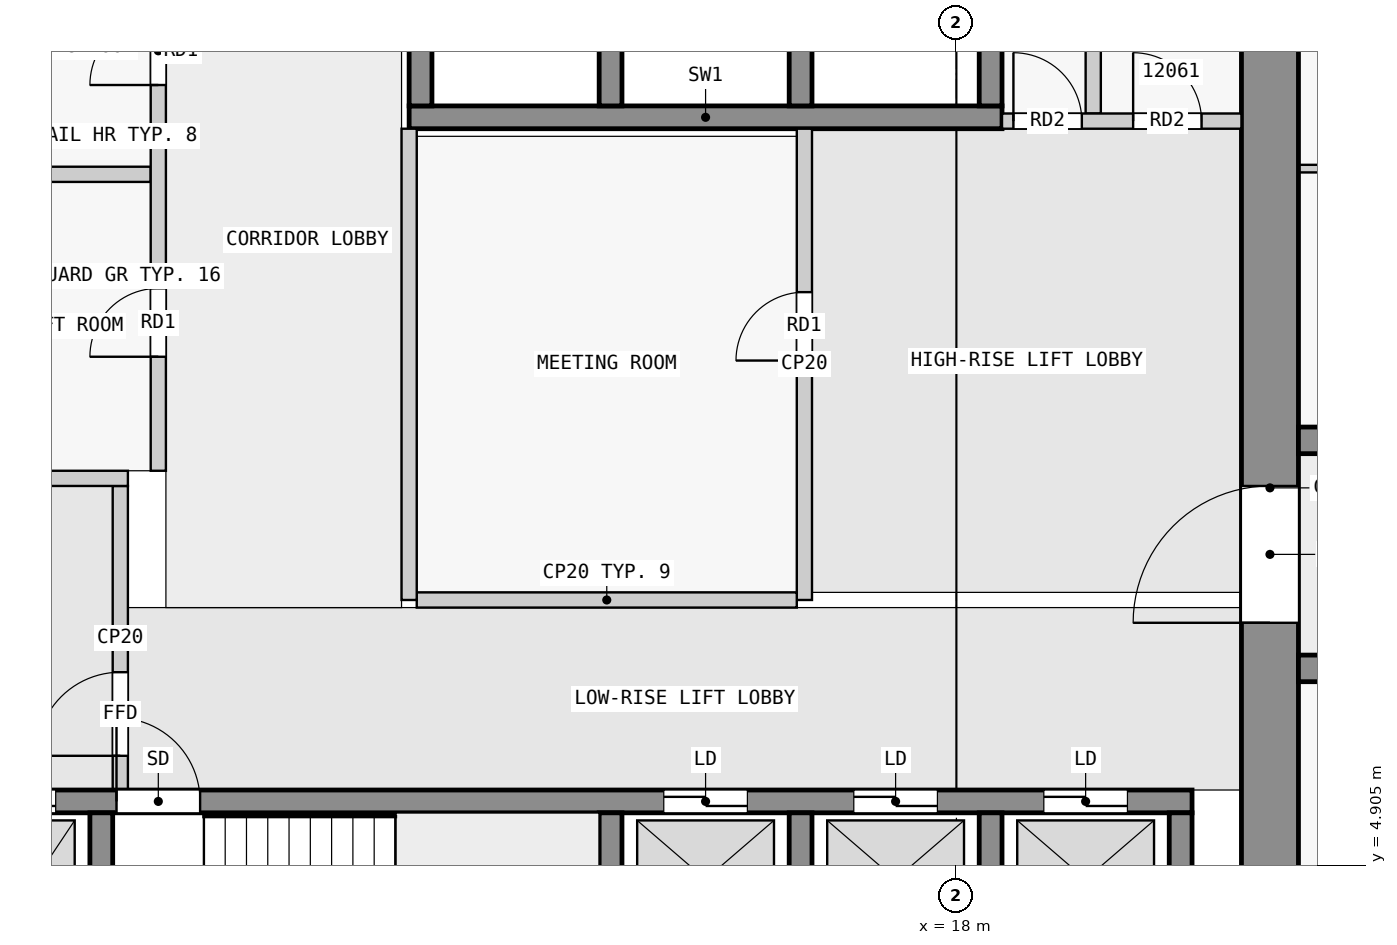
"""IFC4 building model, lengths in metres.
Left out: names, types, materials, properties, quantities, classifications, styles, units other than length and angle.
Written with IfcOpenShell. Run it as: python <this file> out.ifc"""

import sys

from ifc_helpers import new_model, si_unit, direction, frame, frame_2d, origin, place, context, subcontext, project, spatial, rectangle, extrude, element, fill, save


model = new_model("IFC4")
c1 = context("Model", 3, precision=1e-05, world=origin(), true_north=direction((0.0, 1.0)))
c2 = subcontext(c1, "Body", "Model", "MODEL_VIEW")
j1 = project(units=[si_unit("LENGTHUNIT", "METRE"), si_unit("PLANEANGLEUNIT", "RADIAN")], contexts=[c1])
p1 = place(None, origin())
s1 = spatial("IfcSite", under=j1, at=p1, CompositionType="ELEMENT")
p2 = place(p1, origin())
s2 = spatial("IfcBuilding", under=s1, at=p2, CompositionType="ELEMENT")
p3 = place(p2, frame((0.0, 0.0, 51.3)))
s3 = spatial("IfcBuildingStorey", under=s2, at=p3, CompositionType="ELEMENT", Elevation=51.3)
p4 = place(p3, frame((22.125, 2.5, 0.0), z_axis=(0.0, 0.0, 1.0), x_axis=(0.0, 1.0, 0.0)))
e1 = element("IfcWall", 1, at=p4, inside=s3, PredefinedType="SHEAR", context=c2, shape_type="SweptSolid", body=[
    extrude(rectangle(XDim=14.75, YDim=0.75, at=frame_2d((7.375, 0.0))), origin(), (0.0, 0.0, 1.0), 3.25),
])
p5 = place(p4, frame((5.6, 0.0, 0.0)))
e2 = element("IfcOpeningElement", 2, at=p5, cuts=e1, PredefinedType="OPENING", context=c2, shape_type="SweptSolid", body=[
    extrude(rectangle(XDim=1.8, YDim=2.1, at=frame_2d((0.9, 1.05))), frame((0.0, 0.385, 0.0), z_axis=(0.0, -1.0, 0.0), x_axis=(1.0, 0.0, 0.0)), (0.0, 0.0, 1.0), 0.77),
])
for number, where, z_axis, x_axis in (
    (3, (6.75, 2.8, 0.0), (0.0, 0.0, 1.0), (0.0, 1.0, 0.0)),
    (4, (13.45, 2.8, 0.0), (0.0, 0.0, 1.0), (0.0, 1.0, 0.0)),
    (5, (15.95, 2.8, 0.0), (0.0, 0.0, 1.0), (0.0, 1.0, 0.0)),
    (6, (18.45, 2.8, 0.0), (0.0, 0.0, 1.0), (0.0, 1.0, 0.0)),
    (7, (20.95, 2.8, 0.0), (0.0, 0.0, 1.0), (0.0, 1.0, 0.0)),
):
    element("IfcWall", number, at=place(p3, frame(where, z_axis=z_axis, x_axis=x_axis)), inside=s3, PredefinedType="SHEAR", context=c2, shape_type="SweptSolid", body=[
        extrude(rectangle(XDim=2.8, YDim=0.3, at=frame_2d((1.4, 0.0))), origin(), (0.0, 0.0, 1.0), 3.25),
    ])
p6 = place(p3, frame((2.3, 5.75, 0.0), z_axis=(0.0, 0.0, 1.0), x_axis=(1.0, 0.0, 0.0)))
e8 = element("IfcWall", 8, at=p6, inside=s3, PredefinedType="SHEAR", context=c2, shape_type="SweptSolid", body=[
    extrude(rectangle(XDim=18.8, YDim=0.3, at=frame_2d((9.4, 0.0))), origin(), (0.0, 0.0, 1.0), 3.25),
])
p7 = place(p6, frame((4.65, 0.0, 0.0)))
e9 = element("IfcOpeningElement", 9, at=p7, cuts=e8, PredefinedType="OPENING", context=c2, shape_type="SweptSolid", body=[
    extrude(rectangle(XDim=1.1, YDim=2.1, at=frame_2d((0.55, 1.05))), frame((0.0, 0.16, 0.0), z_axis=(0.0, -1.0, 0.0), x_axis=(1.0, 0.0, 0.0)), (0.0, 0.0, 1.0), 0.32),
])
p8 = place(p6, frame((0.45, 0.0, 0.0)))
e10 = element("IfcOpeningElement", 10, at=p8, cuts=e8, PredefinedType="OPENING", context=c2, shape_type="SweptSolid", body=[
    extrude(rectangle(XDim=1.1, YDim=2.1, at=frame_2d((0.55, 1.05))), frame((0.0, 0.16, 0.0), z_axis=(0.0, -1.0, 0.0), x_axis=(1.0, 0.0, 0.0)), (0.0, 0.0, 1.0), 0.32),
])
p9 = place(p6, frame((2.75, 0.0, 0.0)))
e11 = element("IfcOpeningElement", 11, at=p9, cuts=e8, PredefinedType="OPENING", context=c2, shape_type="SweptSolid", body=[
    extrude(rectangle(XDim=1.1, YDim=2.1, at=frame_2d((0.55, 1.05))), frame((0.0, 0.16, 0.0), z_axis=(0.0, -1.0, 0.0), x_axis=(1.0, 0.0, 0.0)), (0.0, 0.0, 1.0), 0.32),
])
p10 = place(p6, frame((11.85, 0.0, 0.0)))
e12 = element("IfcOpeningElement", 12, at=p10, cuts=e8, PredefinedType="OPENING", context=c2, shape_type="SweptSolid", body=[
    extrude(rectangle(XDim=1.1, YDim=2.1, at=frame_2d((0.55, 1.05))), frame((0.0, 0.16, 0.0), z_axis=(0.0, -1.0, 0.0), x_axis=(1.0, 0.0, 0.0)), (0.0, 0.0, 1.0), 0.32),
])
p11 = place(p6, frame((14.35, 0.0, 0.0)))
e13 = element("IfcOpeningElement", 13, at=p11, cuts=e8, PredefinedType="OPENING", context=c2, shape_type="SweptSolid", body=[
    extrude(rectangle(XDim=1.1, YDim=2.1, at=frame_2d((0.55, 1.05))), frame((0.0, 0.16, 0.0), z_axis=(0.0, -1.0, 0.0), x_axis=(1.0, 0.0, 0.0)), (0.0, 0.0, 1.0), 0.32),
])
p12 = place(p6, frame((16.85, 0.0, 0.0)))
e14 = element("IfcOpeningElement", 14, at=p12, cuts=e8, PredefinedType="OPENING", context=c2, shape_type="SweptSolid", body=[
    extrude(rectangle(XDim=1.1, YDim=2.1, at=frame_2d((0.55, 1.05))), frame((0.0, 0.16, 0.0), z_axis=(0.0, -1.0, 0.0), x_axis=(1.0, 0.0, 0.0)), (0.0, 0.0, 1.0), 0.32),
])
p13 = place(p3, frame((10.8, 14.75, 0.0), z_axis=(0.0, 0.0, 1.0), x_axis=(1.0, 0.0, 0.0)))
e15 = element("IfcWall", 15, at=p13, inside=s3, PredefinedType="SHEAR", context=c2, shape_type="SweptSolid", body=[
    extrude(rectangle(XDim=7.8, YDim=0.3, at=frame_2d((3.9, 0.0))), origin(), (0.0, 0.0, 1.0), 3.25),
])
for number, where, z_axis, x_axis in (
    (16, (10.95, 14.9, 0.0), (0.0, 0.0, 1.0), (0.0, 1.0, 0.0)),
    (17, (13.45, 14.9, 0.0), (0.0, 0.0, 1.0), (0.0, 1.0, 0.0)),
    (18, (15.95, 14.9, 0.0), (0.0, 0.0, 1.0), (0.0, 1.0, 0.0)),
    (19, (18.45, 14.9, 0.0), (0.0, 0.0, 1.0), (0.0, 1.0, 0.0)),
):
    element("IfcWall", number, at=place(p3, frame(where, z_axis=z_axis, x_axis=x_axis)), inside=s3, PredefinedType="SHEAR", context=c2, shape_type="SweptSolid", body=[
        extrude(rectangle(XDim=2.0, YDim=0.3, at=frame_2d((1.0, 0.0))), origin(), (0.0, 0.0, 1.0), 3.25),
    ])
p14 = place(p3, frame((22.5, 7.5, 0.0), z_axis=(0.0, 0.0, 1.0), x_axis=(1.0, 0.0, 0.0)))
e20 = element("IfcWall", 20, at=p14, inside=s3, PredefinedType="SHEAR", context=c2, shape_type="SweptSolid", body=[
    extrude(rectangle(XDim=22.5, YDim=0.35, at=frame_2d((11.25, 0.0))), origin(), (0.0, 0.0, 1.0), 3.25),
])
p15 = place(p14, frame((1.75, 0.0, 0.0)))
e21 = element("IfcOpeningElement", 21, at=p15, cuts=e20, PredefinedType="OPENING", context=c2, shape_type="SweptSolid", body=[
    extrude(rectangle(XDim=1.0, YDim=2.1, at=frame_2d((0.5, 1.05))), frame((0.0, 0.185, 0.0), z_axis=(0.0, -1.0, 0.0), x_axis=(1.0, 0.0, 0.0)), (0.0, 0.0, 1.0), 0.37),
])
p16 = place(p14, frame((10.15, 0.0, 0.0)))
e22 = element("IfcOpeningElement", 22, at=p16, cuts=e20, PredefinedType="OPENING", context=c2, shape_type="SweptSolid", body=[
    extrude(rectangle(XDim=1.0, YDim=2.1, at=frame_2d((0.5, 1.05))), frame((0.0, 0.185, 0.0), z_axis=(0.0, -1.0, 0.0), x_axis=(1.0, 0.0, 0.0)), (0.0, 0.0, 1.0), 0.37),
])
p17 = place(p14, frame((18.75, 0.0, 0.0)))
e23 = element("IfcOpeningElement", 23, at=p17, cuts=e20, PredefinedType="OPENING", context=c2, shape_type="SweptSolid", body=[
    extrude(rectangle(XDim=0.9, YDim=2.1, at=frame_2d((0.45, 1.05))), frame((0.0, 0.185, 0.0), z_axis=(0.0, -1.0, 0.0), x_axis=(1.0, 0.0, 0.0)), (0.0, 0.0, 1.0), 0.37),
])
p18 = place(p14, frame((20.95, 0.0, 0.0)))
e24 = element("IfcOpeningElement", 24, at=p18, cuts=e20, PredefinedType="OPENING", context=c2, shape_type="SweptSolid", body=[
    extrude(rectangle(XDim=1.0, YDim=2.1, at=frame_2d((0.5, 1.05))), frame((0.0, 0.185, 0.0), z_axis=(0.0, -1.0, 0.0), x_axis=(1.0, 0.0, 0.0)), (0.0, 0.0, 1.0), 0.37),
])
p19 = place(p3, frame((22.5, 10.5, 0.0), z_axis=(0.0, 0.0, 1.0), x_axis=(1.0, 0.0, 0.0)))
e25 = element("IfcWall", 25, at=p19, inside=s3, PredefinedType="SHEAR", context=c2, shape_type="SweptSolid", body=[
    extrude(rectangle(XDim=22.5, YDim=0.35, at=frame_2d((11.25, 0.0))), origin(), (0.0, 0.0, 1.0), 3.25),
])
p20 = place(p19, frame((1.75, 0.0, 0.0)))
e26 = element("IfcOpeningElement", 26, at=p20, cuts=e25, PredefinedType="OPENING", context=c2, shape_type="SweptSolid", body=[
    extrude(rectangle(XDim=1.0, YDim=2.1, at=frame_2d((0.5, 1.05))), frame((0.0, 0.185, 0.0), z_axis=(0.0, -1.0, 0.0), x_axis=(1.0, 0.0, 0.0)), (0.0, 0.0, 1.0), 0.37),
])
p21 = place(p19, frame((6.25, 0.0, 0.0)))
e27 = element("IfcOpeningElement", 27, at=p21, cuts=e25, PredefinedType="OPENING", context=c2, shape_type="SweptSolid", body=[
    extrude(rectangle(XDim=1.0, YDim=2.1, at=frame_2d((0.5, 1.05))), frame((0.0, 0.185, 0.0), z_axis=(0.0, -1.0, 0.0), x_axis=(1.0, 0.0, 0.0)), (0.0, 0.0, 1.0), 0.37),
])
p22 = place(p19, frame((10.75, 0.0, 0.0)))
e28 = element("IfcOpeningElement", 28, at=p22, cuts=e25, PredefinedType="OPENING", context=c2, shape_type="SweptSolid", body=[
    extrude(rectangle(XDim=1.0, YDim=2.1, at=frame_2d((0.5, 1.05))), frame((0.0, 0.185, 0.0), z_axis=(0.0, -1.0, 0.0), x_axis=(1.0, 0.0, 0.0)), (0.0, 0.0, 1.0), 0.37),
])
p23 = place(p19, frame((16.85, 0.0, 0.0)))
e29 = element("IfcOpeningElement", 29, at=p23, cuts=e25, PredefinedType="OPENING", context=c2, shape_type="SweptSolid", body=[
    extrude(rectangle(XDim=1.0, YDim=2.1, at=frame_2d((0.5, 1.05))), frame((0.0, 0.185, 0.0), z_axis=(0.0, -1.0, 0.0), x_axis=(1.0, 0.0, 0.0)), (0.0, 0.0, 1.0), 0.37),
])
p24 = place(p3, frame((7.0, 5.9, 0.0), z_axis=(0.0, 0.0, 1.0), x_axis=(0.0, 1.0, 0.0)))
e30 = element("IfcWall", 30, at=p24, inside=s3, PredefinedType="PARTITIONING", context=c2, shape_type="SweptSolid", body=[
    extrude(rectangle(XDim=4.0, YDim=0.2, at=frame_2d((2.0, 0.0))), origin(), (0.0, 0.0, 1.0), 3.25),
])
p25 = place(p24, frame((0.45, 0.0, 0.0)))
e31 = element("IfcOpeningElement", 31, at=p25, cuts=e30, PredefinedType="OPENING", context=c2, shape_type="SweptSolid", body=[
    extrude(rectangle(XDim=1.1, YDim=2.1, at=frame_2d((0.55, 1.05))), frame((0.0, 0.11, 0.0), z_axis=(0.0, -1.0, 0.0), x_axis=(1.0, 0.0, 0.0)), (0.0, 0.0, 1.0), 0.22),
])
p26 = place(p3, frame((5.15, 10.0, 0.0), z_axis=(0.0, 0.0, 1.0), x_axis=(1.0, 0.0, 0.0)))
e32 = element("IfcWall", 32, at=p26, inside=s3, PredefinedType="PARTITIONING", context=c2, shape_type="SweptSolid", body=[
    extrude(rectangle(XDim=1.95, YDim=0.2, at=frame_2d((0.975, 0.0))), origin(), (0.0, 0.0, 1.0), 3.25),
])
p27 = place(p3, frame((10.8, 8.4, 0.0), z_axis=(0.0, 0.0, 1.0), x_axis=(0.0, 1.0, 0.0)))
e33 = element("IfcWall", 33, at=p27, inside=s3, PredefinedType="PARTITIONING", context=c2, shape_type="SweptSolid", body=[
    extrude(rectangle(XDim=6.2, YDim=0.2, at=frame_2d((3.1, 0.0))), origin(), (0.0, 0.0, 1.0), 3.25),
])
p28 = place(p3, frame((10.9, 8.4, 0.0), z_axis=(0.0, 0.0, 1.0), x_axis=(1.0, 0.0, 0.0)))
e34 = element("IfcWall", 34, at=p28, inside=s3, PredefinedType="PARTITIONING", context=c2, shape_type="SweptSolid", body=[
    extrude(rectangle(XDim=5.0, YDim=0.2, at=frame_2d((2.5, 0.0))), origin(), (0.0, 0.0, 1.0), 3.25),
])
p29 = place(p3, frame((16.0, 8.4, 0.0), z_axis=(0.0, 0.0, 1.0), x_axis=(0.0, 1.0, 0.0)))
e35 = element("IfcWall", 35, at=p29, inside=s3, PredefinedType="PARTITIONING", context=c2, shape_type="SweptSolid", body=[
    extrude(rectangle(XDim=6.2, YDim=0.2, at=frame_2d((3.1, 0.0))), origin(), (0.0, 0.0, 1.0), 3.25),
])
p30 = place(p29, frame((3.15, 0.0, 0.0)))
e36 = element("IfcOpeningElement", 36, at=p30, cuts=e35, PredefinedType="OPENING", context=c2, shape_type="SweptSolid", body=[
    extrude(rectangle(XDim=0.9, YDim=2.1, at=frame_2d((0.45, 1.05))), frame((0.0, 0.11, 0.0), z_axis=(0.0, -1.0, 0.0), x_axis=(1.0, 0.0, 0.0)), (0.0, 0.0, 1.0), 0.22),
])
p31 = place(p3, frame((7.5, 10.1, 0.0), z_axis=(0.0, 0.0, 1.0), x_axis=(0.0, 1.0, 0.0)))
e37 = element("IfcWall", 37, at=p31, inside=s3, PredefinedType="PARTITIONING", context=c2, shape_type="SweptSolid", body=[
    extrude(rectangle(XDim=7.15, YDim=0.2, at=frame_2d((3.575, 0.0))), origin(), (0.0, 0.0, 1.0), 3.25),
])
p32 = place(p31, frame((1.5, 0.0, 0.0)))
e38 = element("IfcOpeningElement", 38, at=p32, cuts=e37, PredefinedType="OPENING", context=c2, shape_type="SweptSolid", body=[
    extrude(rectangle(XDim=0.9, YDim=2.1, at=frame_2d((0.45, 1.05))), frame((0.0, 0.11, 0.0), z_axis=(0.0, -1.0, 0.0), x_axis=(1.0, 0.0, 0.0)), (0.0, 0.0, 1.0), 0.22),
])
p33 = place(p31, frame((5.075, 0.0, 0.0)))
e39 = element("IfcOpeningElement", 39, at=p33, cuts=e37, PredefinedType="OPENING", context=c2, shape_type="SweptSolid", body=[
    extrude(rectangle(XDim=0.9, YDim=2.1, at=frame_2d((0.45, 1.05))), frame((0.0, 0.11, 0.0), z_axis=(0.0, -1.0, 0.0), x_axis=(1.0, 0.0, 0.0)), (0.0, 0.0, 1.0), 0.22),
])
p34 = place(p3, frame((5.15, 14.0, 0.0), z_axis=(0.0, 0.0, 1.0), x_axis=(1.0, 0.0, 0.0)))
e40 = element("IfcWall", 40, at=p34, inside=s3, PredefinedType="PARTITIONING", context=c2, shape_type="SweptSolid", body=[
    extrude(rectangle(XDim=2.25, YDim=0.2, at=frame_2d((1.125, 0.0))), origin(), (0.0, 0.0, 1.0), 3.25),
])
p35 = place(p3, frame((18.6, 14.7, 0.0), z_axis=(0.0, 0.0, 1.0), x_axis=(1.0, 0.0, 0.0)))
e41 = element("IfcWall", 41, at=p35, inside=s3, PredefinedType="PARTITIONING", context=c2, shape_type="SweptSolid", body=[
    extrude(rectangle(XDim=3.15, YDim=0.2, at=frame_2d((1.575, 0.0))), origin(), (0.0, 0.0, 1.0), 3.25),
])
p36 = place(p35, frame((0.15, 0.0, 0.0)))
e42 = element("IfcOpeningElement", 42, at=p36, cuts=e41, PredefinedType="OPENING", context=c2, shape_type="SweptSolid", body=[
    extrude(rectangle(XDim=0.9, YDim=2.1, at=frame_2d((0.45, 1.05))), frame((0.0, 0.11, 0.0), z_axis=(0.0, -1.0, 0.0), x_axis=(1.0, 0.0, 0.0)), (0.0, 0.0, 1.0), 0.22),
])
p37 = place(p35, frame((1.725, 0.0, 0.0)))
e43 = element("IfcOpeningElement", 43, at=p37, cuts=e41, PredefinedType="OPENING", context=c2, shape_type="SweptSolid", body=[
    extrude(rectangle(XDim=0.9, YDim=2.1, at=frame_2d((0.45, 1.05))), frame((0.0, 0.11, 0.0), z_axis=(0.0, -1.0, 0.0), x_axis=(1.0, 0.0, 0.0)), (0.0, 0.0, 1.0), 0.22),
])
p38 = place(p3, frame((19.8, 14.8, 0.0), z_axis=(0.0, 0.0, 1.0), x_axis=(0.0, 1.0, 0.0)))
e44 = element("IfcWall", 44, at=p38, inside=s3, PredefinedType="PARTITIONING", context=c2, shape_type="SweptSolid", body=[
    extrude(rectangle(XDim=2.45, YDim=0.2, at=frame_2d((1.225, 0.0))), origin(), (0.0, 0.0, 1.0), 3.25),
])
p39 = place(p3, frame((23.95, 14.075, 0.0), z_axis=(0.0, 0.0, 1.0), x_axis=(-1.0, 0.0, 0.0)))
e45 = element("IfcWall", 45, at=p39, inside=s3, PredefinedType="PARTITIONING", context=c2, shape_type="SweptSolid", body=[
    extrude(rectangle(XDim=1.45, YDim=0.1, at=frame_2d((0.725, 0.0))), origin(), (0.0, 0.0, 1.0), 3.25),
])
p40 = place(p25, origin())
e46 = element("IfcDoor", 46, at=p40, inside=s3, OperationType="SINGLE_SWING_LEFT", PredefinedType="DOOR", context=c2, shape_type="SweptSolid", body=[
    extrude(rectangle(XDim=1.1, YDim=2.1, at=frame_2d((0.55, 1.05))), frame((0.0, 0.025, 0.0), z_axis=(0.0, -1.0, 0.0), x_axis=(1.0, 0.0, 0.0)), (0.0, 0.0, 1.0), 0.05),
])
fill(e31, e46)
p41 = place(p30, origin())
e47 = element("IfcDoor", 47, at=p41, inside=s3, OperationType="SINGLE_SWING_LEFT", PredefinedType="DOOR", context=c2, shape_type="SweptSolid", body=[
    extrude(rectangle(XDim=0.9, YDim=2.1, at=frame_2d((0.45, 1.05))), frame((0.0, 0.025, 0.0), z_axis=(0.0, -1.0, 0.0), x_axis=(1.0, 0.0, 0.0)), (0.0, 0.0, 1.0), 0.05),
])
fill(e36, e47)
p42 = place(p7, origin())
e48 = element("IfcDoor", 48, at=p42, inside=s3, OperationType="SINGLE_SWING_LEFT", PredefinedType="DOOR", context=c2, shape_type="SweptSolid", body=[
    extrude(rectangle(XDim=1.1, YDim=2.1, at=frame_2d((0.55, 1.05))), frame((0.0, 0.025, 0.0), z_axis=(0.0, -1.0, 0.0), x_axis=(1.0, 0.0, 0.0)), (0.0, 0.0, 1.0), 0.05),
])
fill(e9, e48)
p43 = place(p9, origin())
e49 = element("IfcDoor", 49, at=p43, inside=s3, OperationType="DOUBLE_DOOR_SLIDING", PredefinedType="DOOR", context=c2, shape_type="SweptSolid", body=[
    extrude(rectangle(XDim=1.1, YDim=2.1, at=frame_2d((0.55, 1.05))), frame((0.0, 0.025, 0.0), z_axis=(0.0, -1.0, 0.0), x_axis=(1.0, 0.0, 0.0)), (0.0, 0.0, 1.0), 0.05),
])
fill(e11, e49)
p44 = place(p10, origin())
e50 = element("IfcDoor", 50, at=p44, inside=s3, OperationType="DOUBLE_DOOR_SLIDING", PredefinedType="DOOR", context=c2, shape_type="SweptSolid", body=[
    extrude(rectangle(XDim=1.1, YDim=2.1, at=frame_2d((0.55, 1.05))), frame((0.0, 0.025, 0.0), z_axis=(0.0, -1.0, 0.0), x_axis=(1.0, 0.0, 0.0)), (0.0, 0.0, 1.0), 0.05),
])
fill(e12, e50)
p45 = place(p11, origin())
e51 = element("IfcDoor", 51, at=p45, inside=s3, OperationType="DOUBLE_DOOR_SLIDING", PredefinedType="DOOR", context=c2, shape_type="SweptSolid", body=[
    extrude(rectangle(XDim=1.1, YDim=2.1, at=frame_2d((0.55, 1.05))), frame((0.0, 0.025, 0.0), z_axis=(0.0, -1.0, 0.0), x_axis=(1.0, 0.0, 0.0)), (0.0, 0.0, 1.0), 0.05),
])
fill(e13, e51)
p46 = place(p12, origin())
e52 = element("IfcDoor", 52, at=p46, inside=s3, OperationType="DOUBLE_DOOR_SLIDING", PredefinedType="DOOR", context=c2, shape_type="SweptSolid", body=[
    extrude(rectangle(XDim=1.1, YDim=2.1, at=frame_2d((0.55, 1.05))), frame((0.0, 0.025, 0.0), z_axis=(0.0, -1.0, 0.0), x_axis=(1.0, 0.0, 0.0)), (0.0, 0.0, 1.0), 0.05),
])
fill(e14, e52)
p47 = place(p5, origin())
e53 = element("IfcDoor", 53, at=p47, inside=s3, OperationType="DOUBLE_DOOR_SINGLE_SWING", PredefinedType="DOOR", context=c2, shape_type="SweptSolid", body=[
    extrude(rectangle(XDim=1.8, YDim=2.1, at=frame_2d((0.9, 1.05))), frame((0.0, 0.025, 0.0), z_axis=(0.0, -1.0, 0.0), x_axis=(1.0, 0.0, 0.0)), (0.0, 0.0, 1.0), 0.05),
])
fill(e2, e53)
p48 = place(p32, origin())
e54 = element("IfcDoor", 54, at=p48, inside=s3, OperationType="SINGLE_SWING_RIGHT", PredefinedType="DOOR", context=c2, shape_type="SweptSolid", body=[
    extrude(rectangle(XDim=0.9, YDim=2.1, at=frame_2d((0.45, 1.05))), frame((0.0, 0.025, 0.0), z_axis=(0.0, -1.0, 0.0), x_axis=(1.0, 0.0, 0.0)), (0.0, 0.0, 1.0), 0.05),
])
fill(e38, e54)
p49 = place(p33, origin())
e55 = element("IfcDoor", 55, at=p49, inside=s3, OperationType="SINGLE_SWING_RIGHT", PredefinedType="DOOR", context=c2, shape_type="SweptSolid", body=[
    extrude(rectangle(XDim=0.9, YDim=2.1, at=frame_2d((0.45, 1.05))), frame((0.0, 0.025, 0.0), z_axis=(0.0, -1.0, 0.0), x_axis=(1.0, 0.0, 0.0)), (0.0, 0.0, 1.0), 0.05),
])
fill(e39, e55)
p50 = place(p36, origin())
e56 = element("IfcDoor", 56, at=p50, inside=s3, OperationType="SINGLE_SWING_LEFT", PredefinedType="DOOR", context=c2, shape_type="SweptSolid", body=[
    extrude(rectangle(XDim=0.9, YDim=2.1, at=frame_2d((0.45, 1.05))), frame((0.0, 0.025, 0.0), z_axis=(0.0, -1.0, 0.0), x_axis=(1.0, 0.0, 0.0)), (0.0, 0.0, 1.0), 0.05),
])
fill(e42, e56)
p51 = place(p37, origin())
e57 = element("IfcDoor", 57, at=p51, inside=s3, OperationType="SINGLE_SWING_LEFT", PredefinedType="DOOR", context=c2, shape_type="SweptSolid", body=[
    extrude(rectangle(XDim=0.9, YDim=2.1, at=frame_2d((0.45, 1.05))), frame((0.0, 0.025, 0.0), z_axis=(0.0, -1.0, 0.0), x_axis=(1.0, 0.0, 0.0)), (0.0, 0.0, 1.0), 0.05),
])
fill(e43, e57)
save(model, sys.argv[1])
